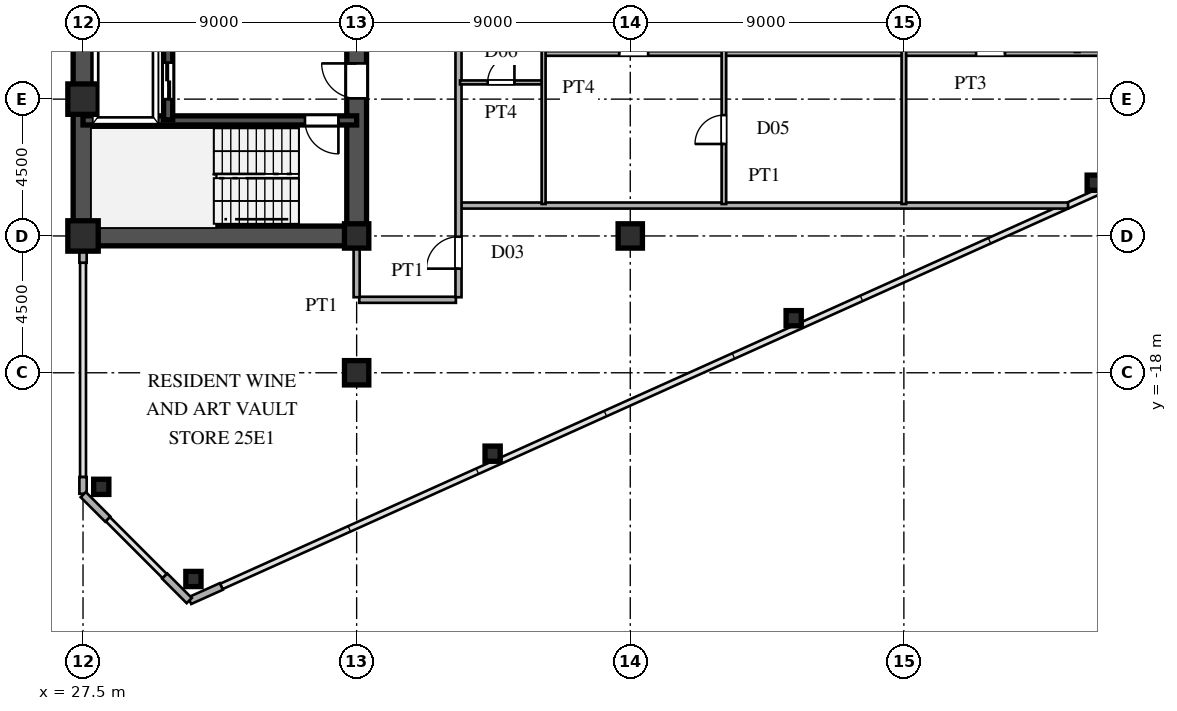
"""IFC4 building model, lengths in metres.
Left out: names, types, materials, properties, quantities, classifications, styles, units other than length and angle.
Written with IfcOpenShell. Run it as: python <this file> out.ifc"""

import sys

from ifc_helpers import new_model, si_unit, direction, frame, frame_2d, origin, origin_2d, place, context, subcontext, project, spatial, rectangle, hollow_rectangle, i_section, extrude, source, transform, mapped, element, fill, save


model = new_model("IFC4")
c1 = context("Model", 3, precision=1e-05, world=origin(), true_north=direction((0.0, 1.0)))
c2 = subcontext(c1, "Body", "Model", "MODEL_VIEW")
j1 = project(units=[si_unit("LENGTHUNIT", "METRE"), si_unit("PLANEANGLEUNIT", "RADIAN")], contexts=[c1])
p1 = place(None, origin())
s1 = spatial("IfcSite", under=j1, at=p1, CompositionType="ELEMENT")
p2 = place(p1, origin())
s2 = spatial("IfcBuilding", under=s1, at=p2, CompositionType="ELEMENT")
p3 = place(p2, frame((0.0, 0.0, 96.0)))
s3 = spatial("IfcBuildingStorey", under=s2, at=p3, CompositionType="ELEMENT", Elevation=96.0)
m1 = source(origin(), c2, "Body", "SweptSolid", [
    extrude(hollow_rectangle(XDim=1.0, YDim=1.0, WallThickness=0.042, at=origin_2d()), origin(), (0.0, 0.0, 1.0), 3.6),
])
for number, where, z_axis, x_axis in (
    (1, (27.5, -13.5, 0.0), (0.0, 0.0, 1.0), (1.0, 0.0, 0.0)),
    (2, (27.5, -9.0, 0.0), (0.0, 0.0, 1.0), (1.0, 0.0, 0.0)),
):
    element("IfcColumn", number, at=place(p3, frame(where, z_axis=z_axis, x_axis=x_axis)), inside=s3, PredefinedType="COLUMN", context=c2, shape_type="MappedRepresentation", body=[
        mapped(m1, transform((0.0, 0.0, 0.0), scale=1.0)),
    ])
m2 = source(origin(), c2, "Body", "SweptSolid", [
    extrude(i_section(OverallWidth=0.8, OverallDepth=0.8, WebThickness=0.032, FlangeThickness=0.05, at=origin_2d()), origin(), (0.0, 0.0, 1.0), 3.6),
])
for number, where, z_axis, x_axis in (
    (3, (36.5, -18.0, 0.0), (0.0, 0.0, 1.0), (1.0, 0.0, 0.0)),
    (4, (36.5, -13.5, 0.0), (0.0, 0.0, 1.0), (1.0, 0.0, 0.0)),
    (5, (45.5, -13.5, 0.0), (0.0, 0.0, 1.0), (1.0, 0.0, 0.0)),
):
    element("IfcColumn", number, at=place(p3, frame(where, z_axis=z_axis, x_axis=x_axis)), inside=s3, PredefinedType="COLUMN", context=c2, shape_type="MappedRepresentation", body=[
        mapped(m2, transform((0.0, 0.0, 0.0), scale=1.0)),
    ])
m3 = source(origin(), c2, "Body", "SweptSolid", [
    extrude(hollow_rectangle(XDim=0.5, YDim=0.5, WallThickness=0.02, at=origin_2d()), origin(), (0.0, 0.0, 1.0), 3.6),
])
for number, where, z_axis, x_axis in (
    (6, (31.131, -24.783, 0.0), (0.0, 0.0, 1.0), (1.0, 0.0, 0.0)),
    (7, (28.1, -21.751, 0.0), (0.0, 0.0, 1.0), (1.0, 0.0, 0.0)),
    (8, (40.973, -20.661, 0.0), (0.0, 0.0, 1.0), (1.0, 0.0, 0.0)),
    (9, (50.875, -16.205, 0.0), (0.0, 0.0, 1.0), (1.0, 0.0, 0.0)),
    (10, (60.778, -11.749, 0.0), (0.0, 0.0, 1.0), (1.0, 0.0, 0.0)),
):
    element("IfcColumn", number, at=place(p3, frame(where, z_axis=z_axis, x_axis=x_axis)), inside=s3, PredefinedType="COLUMN", context=c2, shape_type="MappedRepresentation", body=[
        mapped(m3, transform((0.0, 0.0, 0.0), scale=1.0)),
    ])
p4 = place(p3, frame((31.009, -25.496, 0.0), z_axis=(0.0, 0.0, 1.0), x_axis=(0.911929519623, 0.410346866979, 0.0)))
e11 = element("IfcWall", 11, at=p4, inside=s3, PredefinedType="SOLIDWALL", context=c2, shape_type="SweptSolid", body=[
    extrude(rectangle(XDim=1.14, YDim=0.24, at=frame_2d((0.57, 0.0))), origin(), (0.0, 0.0, 1.0), 3.38),
])
p5 = place(p3, frame((27.5, -21.98, 0.0), z_axis=(0.0, 0.0, 1.0), x_axis=(0.0, 1.0, 0.0)))
e12 = element("IfcWall", 12, at=p5, inside=s3, PredefinedType="SOLIDWALL", context=c2, shape_type="SweptSolid", body=[
    extrude(rectangle(XDim=0.55, YDim=0.24, at=frame_2d((0.275, 0.0))), origin(), (0.0, 0.0, 1.0), 3.38),
])
p6 = place(p3, frame((27.5, -14.38, 0.0), z_axis=(0.0, 0.0, 1.0), x_axis=(0.0, 1.0, 0.0)))
e13 = element("IfcWall", 13, at=p6, inside=s3, PredefinedType="SOLIDWALL", context=c2, shape_type="SweptSolid", body=[
    extrude(rectangle(XDim=0.55, YDim=0.24, at=frame_2d((0.275, 0.0))), origin(), (0.0, 0.0, 1.0), 2.88),
])
for number, where, z_axis, x_axis in (
    (14, (27.507, -22.007, 0.0), (0.0, 0.0, 1.0), (0.707, -0.707, 0.0)),
    (15, (30.187, -24.687, 0.0), (0.0, 0.0, 1.0), (0.707, -0.707, 0.0)),
):
    element("IfcWall", number, at=place(p3, frame(where, z_axis=z_axis, x_axis=x_axis)), inside=s3, PredefinedType="SOLIDWALL", context=c2, shape_type="SweptSolid", body=[
        extrude(rectangle(XDim=1.14, YDim=0.24, at=frame_2d((0.57, 0.0))), origin(), (0.0, 0.0, 1.0), 3.38),
    ])
p7 = place(p3, frame((27.5, -13.5, 0.0), z_axis=(0.0, 0.0, 1.0), x_axis=(0.0, 1.0, 0.0)))
e16 = element("IfcWall", 16, at=p7, inside=s3, PredefinedType="SHEAR", context=c2, shape_type="SweptSolid", body=[
    extrude(rectangle(XDim=12.2, YDim=0.65, at=frame_2d((6.1, 0.0))), origin(), (0.0, 0.0, 1.0), 3.38),
])
p8 = place(p3, frame((27.5, -13.5, 0.0), z_axis=(0.0, 0.0, 1.0), x_axis=(1.0, 0.0, 0.0)))
e17 = element("IfcWall", 17, at=p8, inside=s3, PredefinedType="SHEAR", context=c2, shape_type="SweptSolid", body=[
    extrude(rectangle(XDim=9.0, YDim=0.65, at=frame_2d((4.5, 0.0))), origin(), (0.0, 0.0, 1.0), 3.38),
])
p9 = place(p3, frame((36.5, -13.65, 0.0), z_axis=(0.0, 0.0, 1.0), x_axis=(0.0, 1.0, 0.0)))
e18 = element("IfcWall", 18, at=p9, inside=s3, PredefinedType="SHEAR", context=c2, shape_type="SweptSolid", body=[
    extrude(rectangle(XDim=7.15, YDim=0.65, at=frame_2d((3.575, 0.0))), origin(), (0.0, 0.0, 1.0), 3.38),
])
p10 = place(p9, frame((4.675, 0.0, 0.0)))
e19 = element("IfcOpeningElement", 19, at=p10, cuts=e18, PredefinedType="OPENING", context=c2, shape_type="SweptSolid", body=[
    extrude(rectangle(XDim=1.15, YDim=2.2, at=frame_2d((0.575, 1.1))), frame((0.0, 0.335, 0.0), z_axis=(0.0, -1.0, 0.0), x_axis=(1.0, 0.0, 0.0)), (0.0, 0.0, 1.0), 0.67),
])
p11 = place(p3, frame((27.5, -9.7, 0.0), z_axis=(0.0, 0.0, 1.0), x_axis=(1.0, 0.0, 0.0)))
e20 = element("IfcWall", 20, at=p11, inside=s3, PredefinedType="SHEAR", context=c2, shape_type="SweptSolid", body=[
    extrude(rectangle(XDim=9.0, YDim=0.3, at=frame_2d((4.5, 0.0))), origin(), (0.0, 0.0, 1.0), 3.38),
])
p12 = place(p11, frame((7.3, 0.0, 0.0)))
e21 = element("IfcOpeningElement", 21, at=p12, cuts=e20, PredefinedType="OPENING", context=c2, shape_type="SweptSolid", body=[
    extrude(rectangle(XDim=1.1, YDim=2.2, at=frame_2d((0.55, 1.1))), frame((0.0, 0.16, 0.0), z_axis=(0.0, -1.0, 0.0), x_axis=(1.0, 0.0, 0.0)), (0.0, 0.0, 1.0), 0.32),
])
p13 = place(p3, frame((30.3, -9.68, 0.0), z_axis=(0.0, 0.0, 1.0), x_axis=(0.0, 1.0, 0.0)))
e22 = element("IfcWall", 22, at=p13, inside=s3, PredefinedType="SHEAR", context=c2, shape_type="SweptSolid", body=[
    extrude(rectangle(XDim=2.56, YDim=0.3, at=frame_2d((1.28, 0.0))), origin(), (0.0, 0.0, 1.0), 3.38),
])
p14 = place(p13, frame((0.68, 0.0, 0.0)))
e23 = element("IfcOpeningElement", 23, at=p14, cuts=e22, PredefinedType="OPENING", context=c2, shape_type="SweptSolid", body=[
    extrude(rectangle(XDim=1.2, YDim=2.25, at=frame_2d((0.6, 1.125))), frame((0.0, 0.16, 0.0), z_axis=(0.0, -1.0, 0.0), x_axis=(1.0, 0.0, 0.0)), (0.0, 0.0, 1.0), 0.32),
])
p15 = place(p3, frame((36.585, -15.6, 0.0), z_axis=(0.0, 0.0, 1.0), x_axis=(1.0, 0.0, 0.0)))
e24 = element("IfcWall", 24, at=p15, inside=s3, PredefinedType="PARTITIONING", context=c2, shape_type="SweptSolid", body=[
    extrude(rectangle(XDim=3.18, YDim=0.2, at=frame_2d((1.59, 0.0))), origin(), (0.0, 0.0, 1.0), 3.38),
])
p16 = place(p3, frame((39.93, -12.5, 0.0), z_axis=(0.0, 0.0, 1.0), x_axis=(1.0, 0.0, 0.0)))
e25 = element("IfcWall", 25, at=p16, inside=s3, PredefinedType="PARTITIONING", context=c2, shape_type="SweptSolid", body=[
    extrude(rectangle(XDim=19.971, YDim=0.2, at=frame_2d((9.985, 0.0))), origin(), (0.0, 0.0, 1.0), 3.38),
])
p17 = place(p3, frame((39.9, -8.45, 0.0), z_axis=(0.0, 0.0, 1.0), x_axis=(1.0, 0.0, 0.0)))
e26 = element("IfcWall", 26, at=p17, inside=s3, PredefinedType="PARTITIONING", context=c2, shape_type="SweptSolid", body=[
    extrude(rectangle(XDim=2.7, YDim=0.13, at=frame_2d((1.35, 0.0))), origin(), (0.0, 0.0, 1.0), 3.38),
])
p18 = place(p17, frame((0.91, 0.0, 0.0)))
e27 = element("IfcOpeningElement", 27, at=p18, cuts=e26, PredefinedType="OPENING", context=c2, shape_type="SweptSolid", body=[
    extrude(rectangle(XDim=0.88, YDim=2.1, at=frame_2d((0.44, 1.05))), frame((0.0, 0.075, 0.0), z_axis=(0.0, -1.0, 0.0), x_axis=(1.0, 0.0, 0.0)), (0.0, 0.0, 1.0), 0.15),
])
p19 = place(p3, frame((42.7, -7.5, 0.0), z_axis=(0.0, 0.0, 1.0), x_axis=(1.0, 0.0, 0.0)))
e28 = element("IfcWall", 28, at=p19, inside=s3, PredefinedType="PARTITIONING", context=c2, shape_type="SweptSolid", body=[
    extrude(rectangle(XDim=27.995, YDim=0.15, at=frame_2d((13.998, 0.0))), origin(), (0.0, 0.0, 1.0), 3.38),
])
p20 = place(p19, frame((2.438, 0.0, 0.0)))
e29 = element("IfcOpeningElement", 29, at=p20, cuts=e28, PredefinedType="OPENING", context=c2, shape_type="SweptSolid", body=[
    extrude(rectangle(XDim=0.95, YDim=2.15, at=frame_2d((0.475, 1.075))), frame((0.0, 0.085, 0.0), z_axis=(0.0, -1.0, 0.0), x_axis=(1.0, 0.0, 0.0)), (0.0, 0.0, 1.0), 0.17),
])
p21 = place(p19, frame((14.175, 0.0, 0.0)))
e30 = element("IfcOpeningElement", 30, at=p21, cuts=e28, PredefinedType="OPENING", context=c2, shape_type="SweptSolid", body=[
    extrude(rectangle(XDim=0.95, YDim=2.15, at=frame_2d((0.475, 1.075))), frame((0.0, 0.085, 0.0), z_axis=(0.0, -1.0, 0.0), x_axis=(1.0, 0.0, 0.0)), (0.0, 0.0, 1.0), 0.17),
])
p22 = place(p3, frame((36.5, -15.515, 0.0), z_axis=(0.0, 0.0, 1.0), x_axis=(0.0, 1.0, 0.0)))
e31 = element("IfcWall", 31, at=p22, inside=s3, PredefinedType="PARTITIONING", context=c2, shape_type="SweptSolid", body=[
    extrude(rectangle(XDim=1.685, YDim=0.2, at=frame_2d((0.842, 0.0))), origin(), (0.0, 0.0, 1.0), 2.68),
])
p23 = place(p3, frame((39.85, -15.515, 0.0), z_axis=(0.0, 0.0, 1.0), x_axis=(0.0, 1.0, 0.0)))
e32 = element("IfcWall", 32, at=p23, inside=s3, PredefinedType="PARTITIONING", context=c2, shape_type="SweptSolid", body=[
    extrude(rectangle(XDim=31.03, YDim=0.2, at=frame_2d((15.515, 0.0))), origin(), (0.0, 0.0, 1.0), 3.38),
])
p24 = place(p23, frame((0.94, 0.0, 0.0)))
e33 = element("IfcOpeningElement", 33, at=p24, cuts=e32, PredefinedType="OPENING", context=c2, shape_type="SweptSolid", body=[
    extrude(rectangle(XDim=1.05, YDim=2.25, at=frame_2d((0.525, 1.125))), frame((0.0, 0.11, 0.0), z_axis=(0.0, -1.0, 0.0), x_axis=(1.0, 0.0, 0.0)), (0.0, 0.0, 1.0), 0.22),
])
p25 = place(p23, frame((9.765, 0.0, 0.0)))
e34 = element("IfcOpeningElement", 34, at=p25, cuts=e32, PredefinedType="OPENING", context=c2, shape_type="SweptSolid", body=[
    extrude(rectangle(XDim=1.05, YDim=2.25, at=frame_2d((0.525, 1.125))), frame((0.0, 0.11, 0.0), z_axis=(0.0, -1.0, 0.0), x_axis=(1.0, 0.0, 0.0)), (0.0, 0.0, 1.0), 0.22),
])
p26 = place(p23, frame((24.067, 0.0, 0.0)))
e35 = element("IfcOpeningElement", 35, at=p26, cuts=e32, PredefinedType="OPENING", context=c2, shape_type="SweptSolid", body=[
    extrude(rectangle(XDim=1.05, YDim=2.25, at=frame_2d((0.525, 1.125))), frame((0.0, 0.11, 0.0), z_axis=(0.0, -1.0, 0.0), x_axis=(1.0, 0.0, 0.0)), (0.0, 0.0, 1.0), 0.22),
])
p27 = place(p3, frame((42.65, -12.45, 0.0), z_axis=(0.0, 0.0, 1.0), x_axis=(0.0, 1.0, 0.0)))
e36 = element("IfcWall", 36, at=p27, inside=s3, PredefinedType="PARTITIONING", context=c2, shape_type="SweptSolid", body=[
    extrude(rectangle(XDim=9.9, YDim=0.13, at=frame_2d((4.95, 0.0))), origin(), (0.0, 0.0, 1.0), 3.38),
])
p28 = place(p27, frame((6.975, 0.0, 0.0)))
e37 = element("IfcOpeningElement", 37, at=p28, cuts=e36, PredefinedType="OPENING", context=c2, shape_type="SweptSolid", body=[
    extrude(rectangle(XDim=0.95, YDim=2.15, at=frame_2d((0.475, 1.075))), frame((0.0, 0.075, 0.0), z_axis=(0.0, -1.0, 0.0), x_axis=(1.0, 0.0, 0.0)), (0.0, 0.0, 1.0), 0.15),
])
p29 = place(p3, frame((48.58, -12.45, 0.0), z_axis=(0.0, 0.0, 1.0), x_axis=(0.0, 1.0, 0.0)))
e38 = element("IfcWall", 38, at=p29, inside=s3, PredefinedType="PARTITIONING", context=c2, shape_type="SweptSolid", body=[
    extrude(rectangle(XDim=26.738, YDim=0.15, at=frame_2d((13.369, 0.0))), origin(), (0.0, 0.0, 1.0), 3.38),
])
p30 = place(p29, frame((6.975, 0.0, 0.0)))
e39 = element("IfcOpeningElement", 39, at=p30, cuts=e38, PredefinedType="OPENING", context=c2, shape_type="SweptSolid", body=[
    extrude(rectangle(XDim=0.95, YDim=2.15, at=frame_2d((0.475, 1.075))), frame((0.0, 0.085, 0.0), z_axis=(0.0, -1.0, 0.0), x_axis=(1.0, 0.0, 0.0)), (0.0, 0.0, 1.0), 0.17),
])
p31 = place(p29, frame((1.975, 0.0, 0.0)))
e40 = element("IfcOpeningElement", 40, at=p31, cuts=e38, PredefinedType="OPENING", context=c2, shape_type="SweptSolid", body=[
    extrude(rectangle(XDim=0.95, YDim=2.15, at=frame_2d((0.475, 1.075))), frame((0.0, 0.085, 0.0), z_axis=(0.0, -1.0, 0.0), x_axis=(1.0, 0.0, 0.0)), (0.0, 0.0, 1.0), 0.17),
])
p32 = place(p29, frame((23.354, 0.0, 0.0)))
e41 = element("IfcOpeningElement", 41, at=p32, cuts=e38, PredefinedType="OPENING", context=c2, shape_type="SweptSolid", body=[
    extrude(rectangle(XDim=0.95, YDim=2.15, at=frame_2d((0.475, 1.075))), frame((0.0, 0.085, 0.0), z_axis=(0.0, -1.0, 0.0), x_axis=(1.0, 0.0, 0.0)), (0.0, 0.0, 1.0), 0.17),
])
p33 = place(p29, frame((17.435, 0.0, 0.0)))
e42 = element("IfcOpeningElement", 42, at=p33, cuts=e38, PredefinedType="OPENING", context=c2, shape_type="SweptSolid", body=[
    extrude(rectangle(XDim=0.95, YDim=2.15, at=frame_2d((0.475, 1.075))), frame((0.0, 0.085, 0.0), z_axis=(0.0, -1.0, 0.0), x_axis=(1.0, 0.0, 0.0)), (0.0, 0.0, 1.0), 0.17),
])
p34 = place(p3, frame((54.5, -12.45, 0.0), z_axis=(0.0, 0.0, 1.0), x_axis=(0.0, 1.0, 0.0)))
e43 = element("IfcWall", 43, at=p34, inside=s3, PredefinedType="PARTITIONING", context=c2, shape_type="SweptSolid", body=[
    extrude(rectangle(XDim=26.738, YDim=0.15, at=frame_2d((13.369, 0.0))), origin(), (0.0, 0.0, 1.0), 2.68),
])
p35 = place(p34, frame((6.458, 0.0, 0.0)))
e44 = element("IfcOpeningElement", 44, at=p35, cuts=e43, PredefinedType="OPENING", context=c2, shape_type="SweptSolid", body=[
    extrude(rectangle(XDim=0.95, YDim=2.15, at=frame_2d((0.475, 1.075))), frame((0.0, 0.085, 0.0), z_axis=(0.0, -1.0, 0.0), x_axis=(1.0, 0.0, 0.0)), (0.0, 0.0, 1.0), 0.17),
])
p36 = place(p34, frame((11.975, 0.0, 0.0)))
e45 = element("IfcOpeningElement", 45, at=p36, cuts=e43, PredefinedType="OPENING", context=c2, shape_type="SweptSolid", body=[
    extrude(rectangle(XDim=0.95, YDim=2.15, at=frame_2d((0.475, 1.075))), frame((0.0, 0.085, 0.0), z_axis=(0.0, -1.0, 0.0), x_axis=(1.0, 0.0, 0.0)), (0.0, 0.0, 1.0), 0.17),
])
p37 = place(p34, frame((23.354, 0.0, 0.0)))
e46 = element("IfcOpeningElement", 46, at=p37, cuts=e43, PredefinedType="OPENING", context=c2, shape_type="SweptSolid", body=[
    extrude(rectangle(XDim=0.95, YDim=2.15, at=frame_2d((0.475, 1.075))), frame((0.0, 0.085, 0.0), z_axis=(0.0, -1.0, 0.0), x_axis=(1.0, 0.0, 0.0)), (0.0, 0.0, 1.0), 0.17),
])
p38 = place(p34, frame((17.435, 0.0, 0.0)))
e47 = element("IfcOpeningElement", 47, at=p38, cuts=e43, PredefinedType="OPENING", context=c2, shape_type="SweptSolid", body=[
    extrude(rectangle(XDim=0.95, YDim=2.15, at=frame_2d((0.475, 1.075))), frame((0.0, 0.085, 0.0), z_axis=(0.0, -1.0, 0.0), x_axis=(1.0, 0.0, 0.0)), (0.0, 0.0, 1.0), 0.17),
])
m4 = source(origin(), c2, "Body", "SweptSolid", [
    extrude(rectangle(XDim=1.15, YDim=2.2, at=frame_2d((0.575, 1.1))), frame((0.0, 0.025, 0.0), z_axis=(0.0, -1.0, 0.0), x_axis=(1.0, 0.0, 0.0)), (0.0, 0.0, 1.0), 0.05),
])
p39 = place(p10, origin())
e48 = element("IfcDoor", 48, at=p39, inside=s3, OperationType="SINGLE_SWING_RIGHT", PredefinedType="DOOR", context=c2, shape_type="MappedRepresentation", body=[
    mapped(m4, transform((0.0, 0.0, 0.0), scale=1.0)),
])
fill(e19, e48)
m5 = source(origin(), c2, "Body", "SweptSolid", [
    extrude(rectangle(XDim=1.1, YDim=2.2, at=frame_2d((0.55, 1.1))), frame((0.0, 0.025, 0.0), z_axis=(0.0, -1.0, 0.0), x_axis=(1.0, 0.0, 0.0)), (0.0, 0.0, 1.0), 0.05),
])
p40 = place(p12, frame((1.1, 0.0, 0.0), z_axis=(0.0, 0.0, 1.0), x_axis=(-1.0, 0.0, 0.0)))
e49 = element("IfcDoor", 49, at=p40, inside=s3, OperationType="SINGLE_SWING_RIGHT", PredefinedType="DOOR", context=c2, shape_type="MappedRepresentation", body=[
    mapped(m5, transform((0.0, 0.0, 0.0), scale=1.0)),
])
fill(e21, e49)
m6 = source(origin(), c2, "Body", "SweptSolid", [
    extrude(rectangle(XDim=1.2, YDim=2.25, at=frame_2d((0.6, 1.125))), frame((0.0, 0.025, 0.0), z_axis=(0.0, -1.0, 0.0), x_axis=(1.0, 0.0, 0.0)), (0.0, 0.0, 1.0), 0.05),
])
p41 = place(p14, origin())
e50 = element("IfcDoor", 50, at=p41, inside=s3, OperationType="DOUBLE_DOOR_SLIDING", PredefinedType="DOOR", context=c2, shape_type="MappedRepresentation", body=[
    mapped(m6, transform((0.0, 0.0, 0.0), scale=1.0)),
])
fill(e23, e50)
m7 = source(origin(), c2, "Body", "SweptSolid", [
    extrude(rectangle(XDim=0.88, YDim=2.1, at=frame_2d((0.44, 1.05))), frame((0.0, 0.025, 0.0), z_axis=(0.0, -1.0, 0.0), x_axis=(1.0, 0.0, 0.0)), (0.0, 0.0, 1.0), 0.05),
])
p42 = place(p18, origin())
e51 = element("IfcDoor", 51, at=p42, inside=s3, OperationType="SINGLE_SWING_RIGHT", PredefinedType="DOOR", context=c2, shape_type="MappedRepresentation", body=[
    mapped(m7, transform((0.0, 0.0, 0.0), scale=1.0)),
])
fill(e27, e51)
m8 = source(origin(), c2, "Body", "SweptSolid", [
    extrude(rectangle(XDim=0.95, YDim=2.15, at=frame_2d((0.475, 1.075))), frame((0.0, 0.025, 0.0), z_axis=(0.0, -1.0, 0.0), x_axis=(1.0, 0.0, 0.0)), (0.0, 0.0, 1.0), 0.05),
])
p43 = place(p20, origin())
e52 = element("IfcDoor", 52, at=p43, inside=s3, OperationType="SINGLE_SWING_LEFT", PredefinedType="DOOR", context=c2, shape_type="MappedRepresentation", body=[
    mapped(m8, transform((0.0, 0.0, 0.0), scale=1.0)),
])
fill(e29, e52)
p44 = place(p21, origin())
e53 = element("IfcDoor", 53, at=p44, inside=s3, OperationType="SINGLE_SWING_RIGHT", PredefinedType="DOOR", context=c2, shape_type="MappedRepresentation", body=[
    mapped(m8, transform((0.0, 0.0, 0.0), scale=1.0)),
])
fill(e30, e53)
m9 = source(origin(), c2, "Body", "SweptSolid", [
    extrude(rectangle(XDim=1.05, YDim=2.25, at=frame_2d((0.525, 1.125))), frame((0.0, 0.025, 0.0), z_axis=(0.0, -1.0, 0.0), x_axis=(1.0, 0.0, 0.0)), (0.0, 0.0, 1.0), 0.05),
])
p45 = place(p24, origin())
e54 = element("IfcDoor", 54, at=p45, inside=s3, OperationType="SINGLE_SWING_LEFT", PredefinedType="DOOR", context=c2, shape_type="MappedRepresentation", body=[
    mapped(m9, transform((0.0, 0.0, 0.0), scale=1.0)),
])
fill(e33, e54)
p46 = place(p31, origin())
e55 = element("IfcDoor", 55, at=p46, inside=s3, OperationType="SINGLE_SWING_LEFT", PredefinedType="DOOR", context=c2, shape_type="MappedRepresentation", body=[
    mapped(m8, transform((0.0, 0.0, 0.0), scale=1.0)),
])
fill(e40, e55)
save(model, sys.argv[1])
